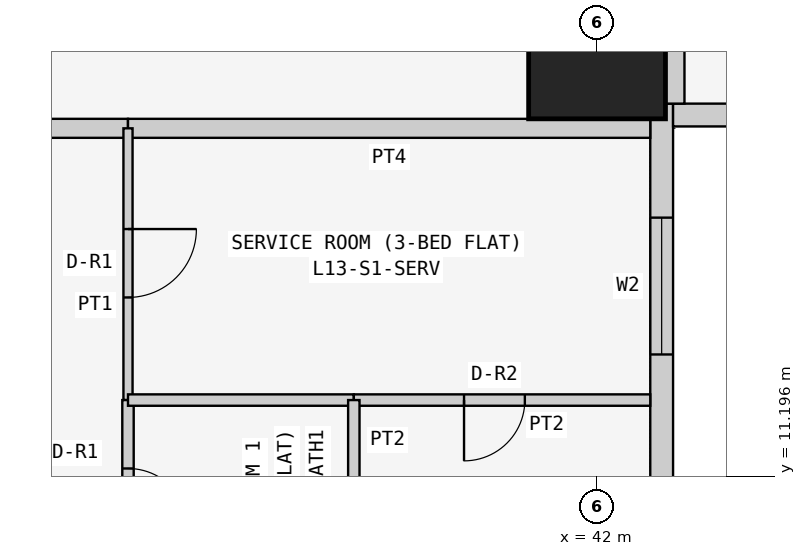
"""IFC4 building model, lengths in metres.
Left out: names, types, materials, properties, quantities, classifications, styles, units other than length and angle.
Written with IfcOpenShell. Run it as: python <this file> out.ifc"""

import sys

from ifc_helpers import new_model, si_unit, direction, frame, frame_2d, origin, origin_2d, place, context, subcontext, project, spatial, rectangle, extrude, element, fill, save


model = new_model("IFC4")
c1 = context("Model", 3, precision=1e-05, world=origin(), true_north=direction((0.0, 1.0)))
c2 = subcontext(c1, "Body", "Model", "MODEL_VIEW")
j1 = project(units=[si_unit("LENGTHUNIT", "METRE"), si_unit("PLANEANGLEUNIT", "RADIAN")], contexts=[c1])
p1 = place(None, origin())
s1 = spatial("IfcSite", under=j1, at=p1, CompositionType="ELEMENT")
p2 = place(p1, origin())
s2 = spatial("IfcBuilding", under=s1, at=p2, CompositionType="ELEMENT")
p3 = place(p2, frame((0.0, 0.0, 56.1)))
s3 = spatial("IfcBuildingStorey", under=s2, at=p3, CompositionType="ELEMENT", Elevation=56.1)
p4 = place(p3, frame((42.0, 16.8, 0.0), z_axis=(0.0, 0.0, 1.0), x_axis=(1.0, 0.0, 0.0)))
e1 = element("IfcColumn", 1, at=p4, inside=s3, PredefinedType="COLUMN", context=c2, shape_type="SweptSolid", body=[
    extrude(rectangle(XDim=1.8, YDim=1.8, at=origin_2d()), origin(), (0.0, 0.0, 1.0), 3.6),
])
p5 = place(p3, frame((42.85, 0.4, 0.0), z_axis=(0.0, 0.0, 1.0), x_axis=(0.0, 1.0, 0.0)))
e2 = element("IfcWall", 2, at=p5, inside=s3, PredefinedType="SOLIDWALL", context=c2, shape_type="SweptSolid", body=[
    extrude(rectangle(XDim=15.7, YDim=0.3, at=frame_2d((7.85, 0.0))), origin(), (0.0, 0.0, 1.0), 3.45),
])
p6 = place(p5, frame((12.4, 0.0, 0.9)))
e3 = element("IfcOpeningElement", 3, at=p6, cuts=e2, PredefinedType="OPENING", context=c2, shape_type="SweptSolid", body=[
    extrude(rectangle(XDim=1.8, YDim=1.5, at=frame_2d((0.9, 0.75))), frame((0.0, 0.16, 0.0), z_axis=(0.0, -1.0, 0.0), x_axis=(1.0, 0.0, 0.0)), (0.0, 0.0, 1.0), 0.32),
])
p7 = place(p5, frame((9.55, 0.0, 1.5)))
e4 = element("IfcOpeningElement", 4, at=p7, cuts=e2, PredefinedType="OPENING", context=c2, shape_type="SweptSolid", body=[
    extrude(rectangle(XDim=0.9, YDim=0.7, at=frame_2d((0.45, 0.35))), frame((0.0, 0.16, 0.0), z_axis=(0.0, -1.0, 0.0), x_axis=(1.0, 0.0, 0.0)), (0.0, 0.0, 1.0), 0.32),
])
p8 = place(p5, frame((5.1, 0.0, 0.9)))
e5 = element("IfcOpeningElement", 5, at=p8, cuts=e2, PredefinedType="OPENING", context=c2, shape_type="SweptSolid", body=[
    extrude(rectangle(XDim=1.8, YDim=1.5, at=frame_2d((0.9, 0.75))), frame((0.0, 0.16, 0.0), z_axis=(0.0, -1.0, 0.0), x_axis=(1.0, 0.0, 0.0)), (0.0, 0.0, 1.0), 0.32),
])
p9 = place(p5, frame((2.0, 0.0, 0.0)))
e6 = element("IfcOpeningElement", 6, at=p9, cuts=e2, PredefinedType="OPENING", context=c2, shape_type="SweptSolid", body=[
    extrude(rectangle(XDim=0.9, YDim=2.4, at=frame_2d((0.45, 1.2))), frame((0.0, 0.16, 0.0), z_axis=(0.0, -1.0, 0.0), x_axis=(1.0, 0.0, 0.0)), (0.0, 0.0, 1.0), 0.32),
])
p10 = place(p5, frame((0.7, 0.0, 0.9)))
e7 = element("IfcOpeningElement", 7, at=p10, cuts=e2, PredefinedType="OPENING", context=c2, shape_type="SweptSolid", body=[
    extrude(rectangle(XDim=1.2, YDim=1.5, at=frame_2d((0.6, 0.75))), frame((0.0, 0.16, 0.0), z_axis=(0.0, -1.0, 0.0), x_axis=(1.0, 0.0, 0.0)), (0.0, 0.0, 1.0), 0.32),
])
p11 = place(p3, frame((43.0, 15.95, 0.0), z_axis=(0.0, 0.0, 1.0), x_axis=(1.0, 0.0, 0.0)))
e8 = element("IfcWall", 8, at=p11, inside=s3, PredefinedType="SOLIDWALL", context=c2, shape_type="SweptSolid", body=[
    extrude(rectangle(XDim=15.4, YDim=0.3, at=frame_2d((7.7, 0.0))), origin(), (0.0, 0.0, 1.0), 3.45),
])
p12 = place(p11, frame((1.2, 0.0, 0.9)))
e9 = element("IfcOpeningElement", 9, at=p12, cuts=e8, PredefinedType="OPENING", context=c2, shape_type="SweptSolid", body=[
    extrude(rectangle(XDim=1.8, YDim=1.5, at=frame_2d((0.9, 0.75))), frame((0.0, 0.16, 0.0), z_axis=(0.0, -1.0, 0.0), x_axis=(1.0, 0.0, 0.0)), (0.0, 0.0, 1.0), 0.32),
])
p13 = place(p11, frame((4.95, 0.0, 1.5)))
e10 = element("IfcOpeningElement", 10, at=p13, cuts=e8, PredefinedType="OPENING", context=c2, shape_type="SweptSolid", body=[
    extrude(rectangle(XDim=0.9, YDim=0.7, at=frame_2d((0.45, 0.35))), frame((0.0, 0.16, 0.0), z_axis=(0.0, -1.0, 0.0), x_axis=(1.0, 0.0, 0.0)), (0.0, 0.0, 1.0), 0.32),
])
p14 = place(p11, frame((8.5, 0.0, 0.9)))
e11 = element("IfcOpeningElement", 11, at=p14, cuts=e8, PredefinedType="OPENING", context=c2, shape_type="SweptSolid", body=[
    extrude(rectangle(XDim=1.8, YDim=1.5, at=frame_2d((0.9, 0.75))), frame((0.0, 0.16, 0.0), z_axis=(0.0, -1.0, 0.0), x_axis=(1.0, 0.0, 0.0)), (0.0, 0.0, 1.0), 0.32),
])
p15 = place(p11, frame((12.5, 0.0, 0.0)))
e12 = element("IfcOpeningElement", 12, at=p15, cuts=e8, PredefinedType="OPENING", context=c2, shape_type="SweptSolid", body=[
    extrude(rectangle(XDim=0.9, YDim=2.4, at=frame_2d((0.45, 1.2))), frame((0.0, 0.16, 0.0), z_axis=(0.0, -1.0, 0.0), x_axis=(1.0, 0.0, 0.0)), (0.0, 0.0, 1.0), 0.32),
])
p16 = place(p11, frame((13.5, 0.0, 0.9)))
e13 = element("IfcOpeningElement", 13, at=p16, cuts=e8, PredefinedType="OPENING", context=c2, shape_type="SweptSolid", body=[
    extrude(rectangle(XDim=1.2, YDim=1.5, at=frame_2d((0.6, 0.75))), frame((0.0, 0.16, 0.0), z_axis=(0.0, -1.0, 0.0), x_axis=(1.0, 0.0, 0.0)), (0.0, 0.0, 1.0), 0.32),
])
p17 = place(p3, frame((43.025, 22.571, 0.0), z_axis=(0.0, 0.0, 1.0), x_axis=(0.0, -1.0, 0.0)))
e14 = element("IfcWall", 14, at=p17, inside=s3, PredefinedType="PARTITIONING", context=c2, shape_type="SweptSolid", body=[
    extrude(rectangle(XDim=6.471, YDim=0.25, at=frame_2d((3.235, 0.0))), origin(), (0.0, 0.0, 1.0), 3.45),
])
p18 = place(p3, frame((35.829, 15.775, 0.0), z_axis=(0.0, 0.0, 1.0), x_axis=(-1.0, 0.0, 0.0)))
e15 = element("IfcWall", 15, at=p18, inside=s3, PredefinedType="PARTITIONING", context=c2, shape_type="SweptSolid", body=[
    extrude(rectangle(XDim=1.2, YDim=0.25, at=frame_2d((0.6, 0.0))), origin(), (0.0, 0.0, 1.0), 3.45),
])
p19 = place(p3, frame((42.7, 15.775, 0.0), z_axis=(0.0, 0.0, 1.0), x_axis=(-1.0, 0.0, 0.0)))
e16 = element("IfcWall", 16, at=p19, inside=s3, PredefinedType="PARTITIONING", context=c2, shape_type="SweptSolid", body=[
    extrude(rectangle(XDim=6.871, YDim=0.25, at=frame_2d((3.436, 0.0))), origin(), (0.0, 0.0, 1.0), 3.45),
])
p20 = place(p3, frame((35.829, 12.2, 0.0), z_axis=(0.0, 0.0, 1.0), x_axis=(0.0, 1.0, 0.0)))
e17 = element("IfcWall", 17, at=p20, inside=s3, PredefinedType="PARTITIONING", context=c2, shape_type="SweptSolid", body=[
    extrude(rectangle(XDim=3.575, YDim=0.12, at=frame_2d((1.788, 0.0))), origin(), (0.0, 0.0, 1.0), 3.45),
])
p21 = place(p20, frame((1.35, 0.0, 0.0)))
e18 = element("IfcOpeningElement", 18, at=p21, cuts=e17, PredefinedType="OPENING", context=c2, shape_type="SweptSolid", body=[
    extrude(rectangle(XDim=0.9, YDim=2.1, at=frame_2d((0.45, 1.05))), frame((0.0, 0.07, 0.0), z_axis=(0.0, -1.0, 0.0), x_axis=(1.0, 0.0, 0.0)), (0.0, 0.0, 1.0), 0.14),
])
p22 = place(p3, frame((35.829, 9.6, 0.0), z_axis=(0.0, 0.0, 1.0), x_axis=(0.0, 1.0, 0.0)))
e19 = element("IfcWall", 19, at=p22, inside=s3, PredefinedType="PARTITIONING", context=c2, shape_type="SweptSolid", body=[
    extrude(rectangle(XDim=2.6, YDim=0.15, at=frame_2d((1.3, 0.0))), origin(), (0.0, 0.0, 1.0), 3.45),
])
p23 = place(p22, frame((0.9, 0.0, 0.0)))
e20 = element("IfcOpeningElement", 20, at=p23, cuts=e19, PredefinedType="OPENING", context=c2, shape_type="SweptSolid", body=[
    extrude(rectangle(XDim=0.8, YDim=2.1, at=frame_2d((0.4, 1.05))), frame((0.0, 0.085, 0.0), z_axis=(0.0, -1.0, 0.0), x_axis=(1.0, 0.0, 0.0)), (0.0, 0.0, 1.0), 0.17),
])
p24 = place(p3, frame((35.829, 12.2, 0.0), z_axis=(0.0, 0.0, 1.0), x_axis=(1.0, 0.0, 0.0)))
e21 = element("IfcWall", 21, at=p24, inside=s3, PredefinedType="PARTITIONING", context=c2, shape_type="SweptSolid", body=[
    extrude(rectangle(XDim=2.971, YDim=0.15, at=frame_2d((1.485, 0.0))), origin(), (0.0, 0.0, 1.0), 3.45),
])
p25 = place(p3, frame((38.8, 12.2, 0.0), z_axis=(0.0, 0.0, 1.0), x_axis=(1.0, 0.0, 0.0)))
e22 = element("IfcWall", 22, at=p25, inside=s3, PredefinedType="PARTITIONING", context=c2, shape_type="SweptSolid", body=[
    extrude(rectangle(XDim=3.9, YDim=0.15, at=frame_2d((1.95, 0.0))), origin(), (0.0, 0.0, 1.0), 3.45),
])
p26 = place(p25, frame((1.45, 0.0, 0.0)))
e23 = element("IfcOpeningElement", 23, at=p26, cuts=e22, PredefinedType="OPENING", context=c2, shape_type="SweptSolid", body=[
    extrude(rectangle(XDim=0.8, YDim=2.1, at=frame_2d((0.4, 1.05))), frame((0.0, 0.085, 0.0), z_axis=(0.0, -1.0, 0.0), x_axis=(1.0, 0.0, 0.0)), (0.0, 0.0, 1.0), 0.17),
])
p27 = place(p3, frame((38.8, 9.6, 0.0), z_axis=(0.0, 0.0, 1.0), x_axis=(0.0, 1.0, 0.0)))
e24 = element("IfcWall", 24, at=p27, inside=s3, PredefinedType="PARTITIONING", context=c2, shape_type="SweptSolid", body=[
    extrude(rectangle(XDim=2.6, YDim=0.15, at=frame_2d((1.3, 0.0))), origin(), (0.0, 0.0, 1.0), 3.45),
])
p28 = place(p6, origin())
e25 = element("IfcWindow", 25, at=p28, inside=s3, PartitioningType="SINGLE_PANEL", PredefinedType="WINDOW", context=c2, shape_type="SweptSolid", body=[
    extrude(rectangle(XDim=1.8, YDim=1.5, at=frame_2d((0.9, 0.75))), frame((0.0, 0.03, 0.0), z_axis=(0.0, -1.0, 0.0), x_axis=(1.0, 0.0, 0.0)), (0.0, 0.0, 1.0), 0.06),
])
fill(e3, e25)
p29 = place(p21, frame((0.9, 0.0, 0.0), z_axis=(0.0, 0.0, 1.0), x_axis=(-1.0, 0.0, 0.0)))
e26 = element("IfcDoor", 26, at=p29, inside=s3, OperationType="SINGLE_SWING_LEFT", PredefinedType="DOOR", context=c2, shape_type="SweptSolid", body=[
    extrude(rectangle(XDim=0.9, YDim=2.1, at=frame_2d((0.45, 1.05))), frame((0.0, 0.025, 0.0), z_axis=(0.0, -1.0, 0.0), x_axis=(1.0, 0.0, 0.0)), (0.0, 0.0, 1.0), 0.05),
])
fill(e18, e26)
p30 = place(p26, frame((0.8, 0.0, 0.0), z_axis=(0.0, 0.0, 1.0), x_axis=(-1.0, 0.0, 0.0)))
e27 = element("IfcDoor", 27, at=p30, inside=s3, OperationType="SINGLE_SWING_RIGHT", PredefinedType="DOOR", context=c2, shape_type="SweptSolid", body=[
    extrude(rectangle(XDim=0.8, YDim=2.1, at=frame_2d((0.4, 1.05))), frame((0.0, 0.025, 0.0), z_axis=(0.0, -1.0, 0.0), x_axis=(1.0, 0.0, 0.0)), (0.0, 0.0, 1.0), 0.05),
])
fill(e23, e27)
p31 = place(p23, frame((0.8, 0.0, 0.0), z_axis=(0.0, 0.0, 1.0), x_axis=(-1.0, 0.0, 0.0)))
e28 = element("IfcDoor", 28, at=p31, inside=s3, OperationType="SINGLE_SWING_RIGHT", PredefinedType="DOOR", context=c2, shape_type="SweptSolid", body=[
    extrude(rectangle(XDim=0.8, YDim=2.1, at=frame_2d((0.4, 1.05))), frame((0.0, 0.025, 0.0), z_axis=(0.0, -1.0, 0.0), x_axis=(1.0, 0.0, 0.0)), (0.0, 0.0, 1.0), 0.05),
])
fill(e20, e28)
save(model, sys.argv[1])
